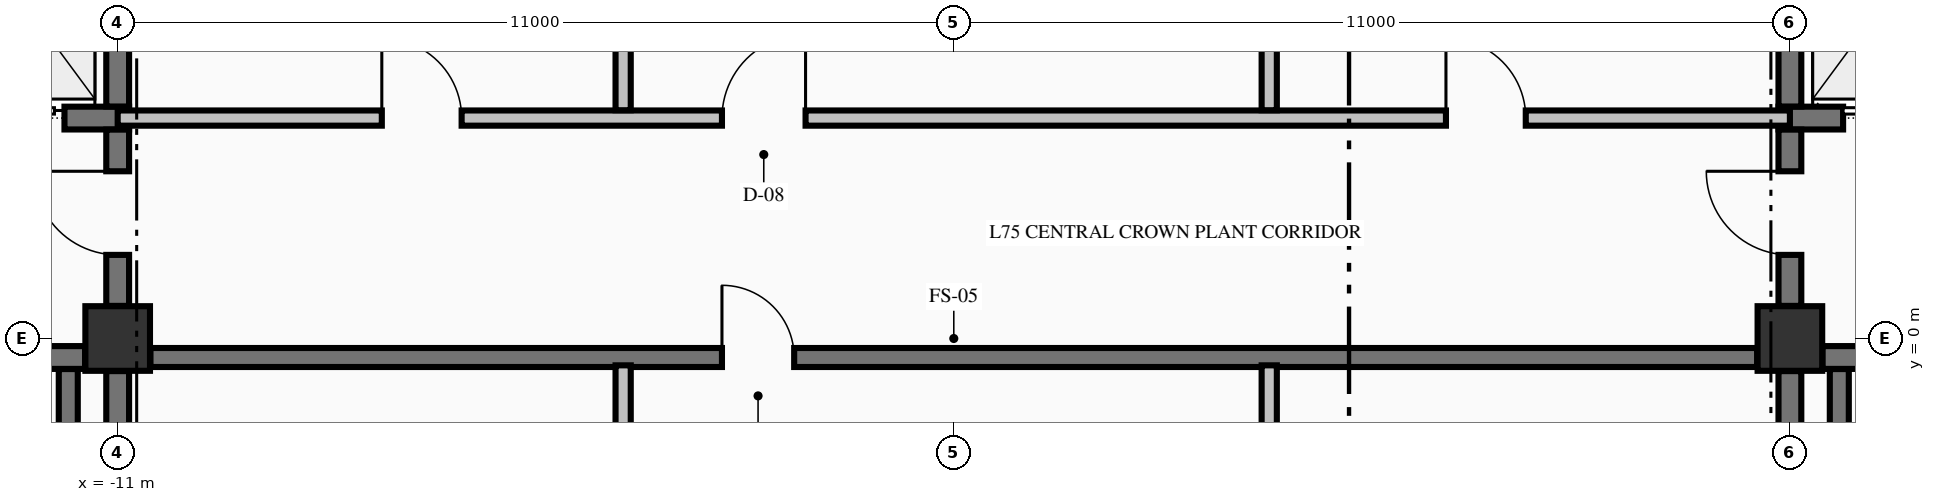
"""IFC4 building model, lengths in metres.
Left out: names, types, materials, properties, quantities, classifications, styles, units other than length and angle.
Written with IfcOpenShell. Run it as: python <this file> out.ifc"""

import sys

from ifc_helpers import new_model, si_unit, direction, frame, frame_2d, origin, origin_2d, place, context, subcontext, project, spatial, rectangle, extrude, element, fill, save


model = new_model("IFC4")
c1 = context("Model", 3, precision=1e-05, world=origin(), true_north=direction((0.0, 1.0)))
c2 = subcontext(c1, "Body", "Model", "MODEL_VIEW")
j1 = project(units=[si_unit("LENGTHUNIT", "METRE"), si_unit("PLANEANGLEUNIT", "RADIAN")], contexts=[c1])
p1 = place(None, origin())
s1 = spatial("IfcSite", under=j1, at=p1, CompositionType="ELEMENT")
p2 = place(p1, origin())
s2 = spatial("IfcBuilding", under=s1, at=p2, CompositionType="ELEMENT")
p3 = place(p2, frame((0.0, 0.0, 281.8)))
s3 = spatial("IfcBuildingStorey", under=s2, at=p3, CompositionType="ELEMENT", Elevation=281.8)
for number, where, z_axis, x_axis in (
    (1, (-11.0, 0.0, -0.325), (0.0, 0.0, 1.0), (1.0, 0.0, 0.0)),
    (2, (11.0, 0.0, -0.325), (0.0, 0.0, 1.0), (1.0, 0.0, 0.0)),
):
    element("IfcColumn", number, at=place(p3, frame(where, z_axis=z_axis, x_axis=x_axis)), inside=s3, PredefinedType="COLUMN", context=c2, shape_type="SweptSolid", body=[
        extrude(rectangle(XDim=0.85, YDim=0.85, at=origin_2d()), origin(), (0.0, 0.0, 1.0), 3.06),
    ])
p4 = place(p3, frame((-14.85, -0.25, 0.0), z_axis=(0.0, 0.0, 1.0), x_axis=(1.0, 0.0, 0.0)))
e3 = element("IfcWall", 3, at=p4, inside=s3, PredefinedType="SHEAR", context=c2, shape_type="SweptSolid", body=[
    extrude(rectangle(XDim=3.421, YDim=0.3, at=frame_2d((1.71, 0.0))), origin(), (0.0, 0.0, 1.0), 2.735),
])
p5 = place(p4, frame((1.15, 0.0, 0.0)))
e4 = element("IfcOpeningElement", 4, at=p5, cuts=e3, PredefinedType="OPENING", context=c2, shape_type="SweptSolid", body=[
    extrude(rectangle(XDim=1.1, YDim=2.15, at=frame_2d((0.55, 1.075))), frame((0.0, 0.16, 0.0), z_axis=(0.0, -1.0, 0.0), x_axis=(1.0, 0.0, 0.0)), (0.0, 0.0, 1.0), 0.32),
])
p6 = place(p3, frame((11.429, -0.25, 0.0), z_axis=(0.0, 0.0, 1.0), x_axis=(1.0, 0.0, 0.0)))
e5 = element("IfcWall", 5, at=p6, inside=s3, PredefinedType="SHEAR", context=c2, shape_type="SweptSolid", body=[
    extrude(rectangle(XDim=3.421, YDim=0.3, at=frame_2d((1.71, 0.0))), origin(), (0.0, 0.0, 1.0), 2.735),
])
p7 = place(p6, frame((1.171, 0.0, 0.0)))
e6 = element("IfcOpeningElement", 6, at=p7, cuts=e5, PredefinedType="OPENING", context=c2, shape_type="SweptSolid", body=[
    extrude(rectangle(XDim=1.1, YDim=2.15, at=frame_2d((0.55, 1.075))), frame((0.0, 0.16, 0.0), z_axis=(0.0, -1.0, 0.0), x_axis=(1.0, 0.0, 0.0)), (0.0, 0.0, 1.0), 0.32),
])
p8 = place(p3, frame((-14.85, 2.9, 0.0), z_axis=(0.0, 0.0, 1.0), x_axis=(1.0, 0.0, 0.0)))
e7 = element("IfcWall", 7, at=p8, inside=s3, PredefinedType="SHEAR", context=c2, shape_type="SweptSolid", body=[
    extrude(rectangle(XDim=4.0, YDim=0.3, at=frame_2d((2.0, 0.0))), origin(), (0.0, 0.0, 1.0), 2.735),
])
p9 = place(p8, frame((2.05, 0.0, 0.0)))
e8 = element("IfcOpeningElement", 8, at=p9, cuts=e7, PredefinedType="OPENING", context=c2, shape_type="SweptSolid", body=[
    extrude(rectangle(XDim=1.1, YDim=2.2, at=frame_2d((0.55, 1.1))), frame((0.0, 0.16, 0.0), z_axis=(0.0, -1.0, 0.0), x_axis=(1.0, 0.0, 0.0)), (0.0, 0.0, 1.0), 0.32),
])
p10 = place(p3, frame((10.85, 2.9, 0.0), z_axis=(0.0, 0.0, 1.0), x_axis=(1.0, 0.0, 0.0)))
e9 = element("IfcWall", 9, at=p10, inside=s3, PredefinedType="SHEAR", context=c2, shape_type="SweptSolid", body=[
    extrude(rectangle(XDim=4.0, YDim=0.3, at=frame_2d((2.0, 0.0))), origin(), (0.0, 0.0, 1.0), 2.735),
])
p11 = place(p10, frame((0.85, 0.0, 0.0)))
e10 = element("IfcOpeningElement", 10, at=p11, cuts=e9, PredefinedType="OPENING", context=c2, shape_type="SweptSolid", body=[
    extrude(rectangle(XDim=1.1, YDim=2.2, at=frame_2d((0.55, 1.1))), frame((0.0, 0.16, 0.0), z_axis=(0.0, -1.0, 0.0), x_axis=(1.0, 0.0, 0.0)), (0.0, 0.0, 1.0), 0.32),
])
p12 = place(p3, frame((-10.569, -0.25, 0.0), z_axis=(0.0, 0.0, 1.0), x_axis=(1.0, 0.0, 0.0)))
e11 = element("IfcWall", 11, at=p12, inside=s3, PredefinedType="SOLIDWALL", context=c2, shape_type="SweptSolid", body=[
    extrude(rectangle(XDim=21.138, YDim=0.25, at=frame_2d((10.569, 0.0))), origin(), (0.0, 0.0, 1.0), 2.735),
])
p13 = place(p12, frame((7.519, 0.0, 0.0)))
e12 = element("IfcOpeningElement", 12, at=p13, cuts=e11, PredefinedType="OPENING", context=c2, shape_type="SweptSolid", body=[
    extrude(rectangle(XDim=0.95, YDim=2.02, at=frame_2d((0.475, 1.01))), frame((0.0, 0.135, 0.0), z_axis=(0.0, -1.0, 0.0), x_axis=(1.0, 0.0, 0.0)), (0.0, 0.0, 1.0), 0.27),
])
p14 = place(p3, frame((-11.0, 2.9, 0.0), z_axis=(0.0, 0.0, 1.0), x_axis=(1.0, 0.0, 0.0)))
e13 = element("IfcWall", 13, at=p14, inside=s3, PredefinedType="PARTITIONING", context=c2, shape_type="SweptSolid", body=[
    extrude(rectangle(XDim=22.0, YDim=0.2, at=frame_2d((11.0, 0.0))), origin(), (0.0, 0.0, 1.0), 2.735),
])
p15 = place(p14, frame((7.95, 0.0, 0.0)))
e14 = element("IfcOpeningElement", 14, at=p15, cuts=e13, PredefinedType="OPENING", context=c2, shape_type="SweptSolid", body=[
    extrude(rectangle(XDim=1.1, YDim=2.15, at=frame_2d((0.55, 1.075))), frame((0.0, 0.11, 0.0), z_axis=(0.0, -1.0, 0.0), x_axis=(1.0, 0.0, 0.0)), (0.0, 0.0, 1.0), 0.22),
])
p16 = place(p14, frame((17.475, 0.0, 0.0)))
e15 = element("IfcOpeningElement", 15, at=p16, cuts=e13, PredefinedType="OPENING", context=c2, shape_type="SweptSolid", body=[
    extrude(rectangle(XDim=1.05, YDim=2.15, at=frame_2d((0.525, 1.075))), frame((0.0, 0.11, 0.0), z_axis=(0.0, -1.0, 0.0), x_axis=(1.0, 0.0, 0.0)), (0.0, 0.0, 1.0), 0.22),
])
p17 = place(p14, frame((3.475, 0.0, 0.0)))
e16 = element("IfcOpeningElement", 16, at=p17, cuts=e13, PredefinedType="OPENING", context=c2, shape_type="SweptSolid", body=[
    extrude(rectangle(XDim=1.05, YDim=2.15, at=frame_2d((0.525, 1.075))), frame((0.0, 0.11, 0.0), z_axis=(0.0, -1.0, 0.0), x_axis=(1.0, 0.0, 0.0)), (0.0, 0.0, 1.0), 0.22),
])
p18 = place(p3, frame((-11.65, -9.798, 0.0), z_axis=(0.0, 0.0, 1.0), x_axis=(0.0, 1.0, 0.0)))
e17 = element("IfcWall", 17, at=p18, inside=s3, PredefinedType="SOLIDWALL", context=c2, shape_type="SweptSolid", body=[
    extrude(rectangle(XDim=9.396, YDim=0.25, at=frame_2d((4.698, 0.0))), origin(), (0.0, 0.0, 1.0), 2.735),
])
p19 = place(p3, frame((-11.0, -9.798, 0.0), z_axis=(0.0, 0.0, 1.0), x_axis=(0.0, 1.0, 0.0)))
e18 = element("IfcWall", 18, at=p19, inside=s3, PredefinedType="SHEAR", context=c2, shape_type="SweptSolid", body=[
    extrude(rectangle(XDim=9.369, YDim=0.3, at=frame_2d((4.685, 0.0))), origin(), (0.0, 0.0, 1.0), 2.735),
])
p20 = place(p3, frame((-11.0, 0.429, 0.0), z_axis=(0.0, 0.0, 1.0), x_axis=(0.0, 1.0, 0.0)))
e19 = element("IfcWall", 19, at=p20, inside=s3, PredefinedType="SHEAR", context=c2, shape_type="SweptSolid", body=[
    extrude(rectangle(XDim=2.319, YDim=0.3, at=frame_2d((1.16, 0.0))), origin(), (0.0, 0.0, 1.0), 2.735),
])
p21 = place(p20, frame((0.671, 0.0, 0.0)))
e20 = element("IfcOpeningElement", 20, at=p21, cuts=e19, PredefinedType="OPENING", context=c2, shape_type="SweptSolid", body=[
    extrude(rectangle(XDim=1.1, YDim=2.15, at=frame_2d((0.55, 1.075))), frame((0.0, 0.16, 0.0), z_axis=(0.0, -1.0, 0.0), x_axis=(1.0, 0.0, 0.0)), (0.0, 0.0, 1.0), 0.32),
])
p22 = place(p3, frame((-11.0, 3.052, 0.0), z_axis=(0.0, 0.0, 1.0), x_axis=(0.0, 1.0, 0.0)))
e21 = element("IfcWall", 21, at=p22, inside=s3, PredefinedType="SHEAR", context=c2, shape_type="SweptSolid", body=[
    extrude(rectangle(XDim=2.496, YDim=0.3, at=frame_2d((1.248, 0.0))), origin(), (0.0, 0.0, 1.0), 2.735),
])
p23 = place(p3, frame((11.0, -9.798, 0.0), z_axis=(0.0, 0.0, 1.0), x_axis=(0.0, 1.0, 0.0)))
e22 = element("IfcWall", 22, at=p23, inside=s3, PredefinedType="SHEAR", context=c2, shape_type="SweptSolid", body=[
    extrude(rectangle(XDim=9.369, YDim=0.3, at=frame_2d((4.685, 0.0))), origin(), (0.0, 0.0, 1.0), 2.735),
])
p24 = place(p3, frame((11.0, 0.429, 0.0), z_axis=(0.0, 0.0, 1.0), x_axis=(0.0, 1.0, 0.0)))
e23 = element("IfcWall", 23, at=p24, inside=s3, PredefinedType="SHEAR", context=c2, shape_type="SweptSolid", body=[
    extrude(rectangle(XDim=2.319, YDim=0.3, at=frame_2d((1.16, 0.0))), origin(), (0.0, 0.0, 1.0), 2.735),
])
p25 = place(p24, frame((0.671, 0.0, 0.0)))
e24 = element("IfcOpeningElement", 24, at=p25, cuts=e23, PredefinedType="OPENING", context=c2, shape_type="SweptSolid", body=[
    extrude(rectangle(XDim=1.1, YDim=2.15, at=frame_2d((0.55, 1.075))), frame((0.0, 0.16, 0.0), z_axis=(0.0, -1.0, 0.0), x_axis=(1.0, 0.0, 0.0)), (0.0, 0.0, 1.0), 0.32),
])
p26 = place(p3, frame((11.0, 3.052, 0.0), z_axis=(0.0, 0.0, 1.0), x_axis=(0.0, 1.0, 0.0)))
e25 = element("IfcWall", 25, at=p26, inside=s3, PredefinedType="SHEAR", context=c2, shape_type="SweptSolid", body=[
    extrude(rectangle(XDim=2.496, YDim=0.3, at=frame_2d((1.248, 0.0))), origin(), (0.0, 0.0, 1.0), 2.735),
])
p27 = place(p3, frame((11.65, -9.798, 0.0), z_axis=(0.0, 0.0, 1.0), x_axis=(0.0, 1.0, 0.0)))
e26 = element("IfcWall", 26, at=p27, inside=s3, PredefinedType="SOLIDWALL", context=c2, shape_type="SweptSolid", body=[
    extrude(rectangle(XDim=9.396, YDim=0.25, at=frame_2d((4.698, 0.0))), origin(), (0.0, 0.0, 1.0), 2.735),
])
p28 = place(p3, frame((-4.35, -6.172, 0.0), z_axis=(0.0, 0.0, 1.0), x_axis=(0.0, 1.0, 0.0)))
e27 = element("IfcWall", 27, at=p28, inside=s3, PredefinedType="PARTITIONING", context=c2, shape_type="SweptSolid", body=[
    extrude(rectangle(XDim=5.819, YDim=0.2, at=frame_2d((2.91, 0.0))), origin(), (0.0, 0.0, 1.0), 2.735),
])
p29 = place(p28, frame((2.447, 0.0, 0.0)))
e28 = element("IfcOpeningElement", 28, at=p29, cuts=e27, PredefinedType="OPENING", context=c2, shape_type="SweptSolid", body=[
    extrude(rectangle(XDim=1.05, YDim=2.15, at=frame_2d((0.525, 1.075))), frame((0.0, 0.11, 0.0), z_axis=(0.0, -1.0, 0.0), x_axis=(1.0, 0.0, 0.0)), (0.0, 0.0, 1.0), 0.22),
])
p30 = place(p3, frame((-4.35, 3.003, 0.0), z_axis=(0.0, 0.0, 1.0), x_axis=(0.0, 1.0, 0.0)))
e29 = element("IfcWall", 29, at=p30, inside=s3, PredefinedType="PARTITIONING", context=c2, shape_type="SweptSolid", body=[
    extrude(rectangle(XDim=3.169, YDim=0.2, at=frame_2d((1.584, 0.0))), origin(), (0.0, 0.0, 1.0), 2.735),
])
p31 = place(p3, frame((4.15, -6.172, 0.0), z_axis=(0.0, 0.0, 1.0), x_axis=(0.0, 1.0, 0.0)))
e30 = element("IfcWall", 30, at=p31, inside=s3, PredefinedType="PARTITIONING", context=c2, shape_type="SweptSolid", body=[
    extrude(rectangle(XDim=5.819, YDim=0.2, at=frame_2d((2.91, 0.0))), origin(), (0.0, 0.0, 1.0), 2.735),
])
p32 = place(p31, frame((2.447, 0.0, 0.0)))
e31 = element("IfcOpeningElement", 31, at=p32, cuts=e30, PredefinedType="OPENING", context=c2, shape_type="SweptSolid", body=[
    extrude(rectangle(XDim=1.05, YDim=2.15, at=frame_2d((0.525, 1.075))), frame((0.0, 0.11, 0.0), z_axis=(0.0, -1.0, 0.0), x_axis=(1.0, 0.0, 0.0)), (0.0, 0.0, 1.0), 0.22),
])
p33 = place(p3, frame((4.15, 3.003, 0.0), z_axis=(0.0, 0.0, 1.0), x_axis=(0.0, 1.0, 0.0)))
e32 = element("IfcWall", 32, at=p33, inside=s3, PredefinedType="PARTITIONING", context=c2, shape_type="SweptSolid", body=[
    extrude(rectangle(XDim=3.169, YDim=0.2, at=frame_2d((1.584, 0.0))), origin(), (0.0, 0.0, 1.0), 2.735),
])
p34 = place(p21, origin())
e33 = element("IfcDoor", 33, at=p34, inside=s3, OperationType="SINGLE_SWING_RIGHT", PredefinedType="DOOR", context=c2, shape_type="SweptSolid", body=[
    extrude(rectangle(XDim=1.1, YDim=2.15, at=frame_2d((0.55, 1.075))), frame((0.0, 0.025, 0.0), z_axis=(0.0, -1.0, 0.0), x_axis=(1.0, 0.0, 0.0)), (0.0, 0.0, 1.0), 0.05),
])
fill(e20, e33)
p35 = place(p9, origin())
e34 = element("IfcDoor", 34, at=p35, inside=s3, OperationType="SLIDING_TO_LEFT", PredefinedType="DOOR", context=c2, shape_type="SweptSolid", body=[
    extrude(rectangle(XDim=1.1, YDim=2.2, at=frame_2d((0.55, 1.1))), frame((0.0, 0.025, 0.0), z_axis=(0.0, -1.0, 0.0), x_axis=(1.0, 0.0, 0.0)), (0.0, 0.0, 1.0), 0.05),
])
fill(e8, e34)
p36 = place(p25, origin())
e35 = element("IfcDoor", 35, at=p36, inside=s3, OperationType="SINGLE_SWING_RIGHT", PredefinedType="DOOR", context=c2, shape_type="SweptSolid", body=[
    extrude(rectangle(XDim=1.1, YDim=2.15, at=frame_2d((0.55, 1.075))), frame((0.0, 0.025, 0.0), z_axis=(0.0, -1.0, 0.0), x_axis=(1.0, 0.0, 0.0)), (0.0, 0.0, 1.0), 0.05),
])
fill(e24, e35)
p37 = place(p11, origin())
e36 = element("IfcDoor", 36, at=p37, inside=s3, OperationType="SLIDING_TO_RIGHT", PredefinedType="DOOR", context=c2, shape_type="SweptSolid", body=[
    extrude(rectangle(XDim=1.1, YDim=2.2, at=frame_2d((0.55, 1.1))), frame((0.0, 0.025, 0.0), z_axis=(0.0, -1.0, 0.0), x_axis=(1.0, 0.0, 0.0)), (0.0, 0.0, 1.0), 0.05),
])
fill(e10, e36)
p38 = place(p13, origin())
e37 = element("IfcDoor", 37, at=p38, inside=s3, OperationType="SINGLE_SWING_LEFT", PredefinedType="DOOR", context=c2, shape_type="SweptSolid", body=[
    extrude(rectangle(XDim=0.95, YDim=2.02, at=frame_2d((0.475, 1.01))), frame((0.0, 0.025, 0.0), z_axis=(0.0, -1.0, 0.0), x_axis=(1.0, 0.0, 0.0)), (0.0, 0.0, 1.0), 0.05),
])
fill(e12, e37)
p39 = place(p15, origin())
e38 = element("IfcDoor", 38, at=p39, inside=s3, OperationType="SINGLE_SWING_RIGHT", PredefinedType="DOOR", context=c2, shape_type="SweptSolid", body=[
    extrude(rectangle(XDim=1.1, YDim=2.15, at=frame_2d((0.55, 1.075))), frame((0.0, 0.025, 0.0), z_axis=(0.0, -1.0, 0.0), x_axis=(1.0, 0.0, 0.0)), (0.0, 0.0, 1.0), 0.05),
])
fill(e14, e38)
p40 = place(p16, origin())
e39 = element("IfcDoor", 39, at=p40, inside=s3, OperationType="SINGLE_SWING_LEFT", PredefinedType="DOOR", context=c2, shape_type="SweptSolid", body=[
    extrude(rectangle(XDim=1.05, YDim=2.15, at=frame_2d((0.525, 1.075))), frame((0.0, 0.025, 0.0), z_axis=(0.0, -1.0, 0.0), x_axis=(1.0, 0.0, 0.0)), (0.0, 0.0, 1.0), 0.05),
])
fill(e15, e39)
p41 = place(p17, origin())
e40 = element("IfcDoor", 40, at=p41, inside=s3, OperationType="SINGLE_SWING_LEFT", PredefinedType="DOOR", context=c2, shape_type="SweptSolid", body=[
    extrude(rectangle(XDim=1.05, YDim=2.15, at=frame_2d((0.525, 1.075))), frame((0.0, 0.025, 0.0), z_axis=(0.0, -1.0, 0.0), x_axis=(1.0, 0.0, 0.0)), (0.0, 0.0, 1.0), 0.05),
])
fill(e16, e40)
save(model, sys.argv[1])
